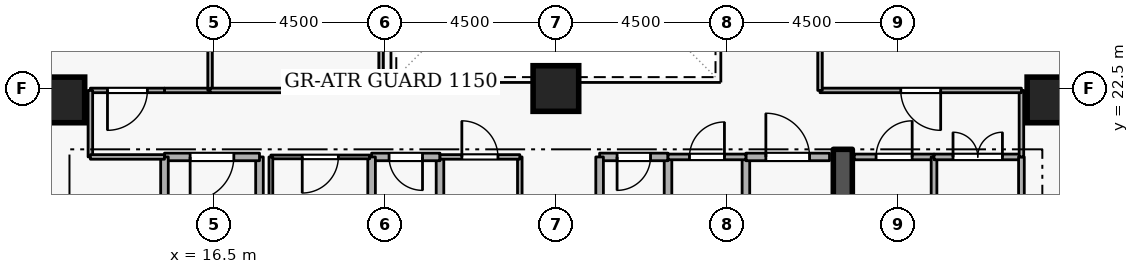
"""IFC4 building model, lengths in metres.
Left out: names, types, materials, properties, quantities, classifications, styles, units other than length and angle.
Written with IfcOpenShell. Run it as: python <this file> out.ifc"""

import sys

from ifc_helpers import new_model, si_unit, direction, frame, frame_2d, origin, origin_2d, place, context, subcontext, project, spatial, rectangle, extrude, element, fill, save


model = new_model("IFC4")
c1 = context("Model", 3, precision=1e-05, world=origin(), true_north=direction((0.0, 1.0)))
c2 = subcontext(c1, "Body", "Model", "MODEL_VIEW")
j1 = project(units=[si_unit("LENGTHUNIT", "METRE"), si_unit("PLANEANGLEUNIT", "RADIAN")], contexts=[c1])
p1 = place(None, origin())
s1 = spatial("IfcSite", under=j1, at=p1, CompositionType="ELEMENT")
p2 = place(p1, origin())
s2 = spatial("IfcBuilding", under=s1, at=p2, CompositionType="ELEMENT")
p3 = place(p2, frame((0.0, 0.0, 130.5)))
s3 = spatial("IfcBuildingStorey", under=s2, at=p3, CompositionType="ELEMENT", Elevation=130.5)
p4 = place(p3, frame((33.05, 15.1, 0.0), z_axis=(0.0, 0.0, 1.0), x_axis=(0.0, 1.0, 0.0)))
e1 = element("IfcWall", 1, at=p4, inside=s3, PredefinedType="SHEAR", context=c2, shape_type="SweptSolid", body=[
    extrude(rectangle(XDim=5.8, YDim=0.5, at=frame_2d((2.9, 0.0))), origin(), (0.0, 0.0, 1.0), 3.6),
])
for number, where, z_axis, x_axis in (
    (2, (12.5, 22.2, 0.0), (0.0, 0.0, 1.0), (1.0, 0.0, 0.0)),
    (3, (38.5, 22.2, 0.0), (0.0, 0.0, 1.0), (1.0, 0.0, 0.0)),
    (4, (25.5, 22.5, 0.0), (0.0, 0.0, 1.0), (1.0, 0.0, 0.0)),
):
    element("IfcColumn", number, at=place(p3, frame(where, z_axis=z_axis, x_axis=x_axis)), inside=s3, PredefinedType="COLUMN", context=c2, shape_type="SweptSolid", body=[
        extrude(rectangle(XDim=1.2, YDim=1.2, at=origin_2d()), origin(), (0.0, 0.0, 1.0), 3.6),
    ])
p5 = place(p3, frame((17.7, 18.4, 0.0), z_axis=(0.0, 0.0, 1.0), x_axis=(0.0, 1.0, 0.0)))
e5 = element("IfcWall", 5, at=p5, inside=s3, PredefinedType="STANDARD", context=c2, shape_type="SweptSolid", body=[
    extrude(rectangle(XDim=2.3, YDim=0.2, at=frame_2d((1.15, 0.0))), origin(), (0.0, 0.0, 1.0), 2.545),
])
p6 = place(p3, frame((17.7, 20.7, 0.0), z_axis=(0.0, 0.0, 1.0), x_axis=(-1.0, 0.0, 0.0)))
e6 = element("IfcWall", 6, at=p6, inside=s3, PredefinedType="STANDARD", context=c2, shape_type="SweptSolid", body=[
    extrude(rectangle(XDim=2.5, YDim=0.2, at=frame_2d((1.25, 0.0))), origin(), (0.0, 0.0, 1.0), 3.34),
])
p7 = place(p6, frame((0.675, 0.0, 0.0)))
e7 = element("IfcOpeningElement", 7, at=p7, cuts=e6, PredefinedType="OPENING", context=c2, shape_type="SweptSolid", body=[
    extrude(rectangle(XDim=1.15, YDim=2.1, at=frame_2d((0.575, 1.05))), frame((0.0, 0.11, 0.0), z_axis=(0.0, -1.0, 0.0), x_axis=(1.0, 0.0, 0.0)), (0.0, 0.0, 1.0), 0.22),
])
p8 = place(p3, frame((15.2, 20.7, 0.0), z_axis=(0.0, 0.0, 1.0), x_axis=(0.0, -1.0, 0.0)))
e8 = element("IfcWall", 8, at=p8, inside=s3, PredefinedType="STANDARD", context=c2, shape_type="SweptSolid", body=[
    extrude(rectangle(XDim=5.7, YDim=0.2, at=frame_2d((2.85, 0.0))), origin(), (0.0, 0.0, 1.0), 3.34),
])
p9 = place(p3, frame((28.45, 18.65, 0.0), z_axis=(0.0, 0.0, 1.0), x_axis=(0.0, 1.0, 0.0)))
e9 = element("IfcWall", 9, at=p9, inside=s3, PredefinedType="STANDARD", context=c2, shape_type="SweptSolid", body=[
    extrude(rectangle(XDim=2.05, YDim=0.2, at=frame_2d((1.025, 0.0))), origin(), (0.0, 0.0, 1.0), 3.34),
])
p10 = place(p3, frame((28.45, 20.7, 0.0), z_axis=(0.0, 0.0, 1.0), x_axis=(-1.0, 0.0, 0.0)))
e10 = element("IfcWall", 10, at=p10, inside=s3, PredefinedType="STANDARD", context=c2, shape_type="SweptSolid", body=[
    extrude(rectangle(XDim=1.8, YDim=0.2, at=frame_2d((0.9, 0.0))), origin(), (0.0, 0.0, 1.0), 3.34),
])
p11 = place(p10, frame((0.46, 0.0, 0.0)))
e11 = element("IfcOpeningElement", 11, at=p11, cuts=e10, PredefinedType="OPENING", context=c2, shape_type="SweptSolid", body=[
    extrude(rectangle(XDim=0.88, YDim=2.04, at=frame_2d((0.44, 1.02))), frame((0.0, 0.11, 0.0), z_axis=(0.0, -1.0, 0.0), x_axis=(1.0, 0.0, 0.0)), (0.0, 0.0, 1.0), 0.22),
])
for number, where, z_axis, x_axis in (
    (12, (26.65, 20.7, 0.0), (0.0, 0.0, 1.0), (0.0, -1.0, 0.0)),
    (13, (22.45, 18.65, 0.0), (0.0, 0.0, 1.0), (0.0, 1.0, 0.0)),
):
    element("IfcWall", number, at=place(p3, frame(where, z_axis=z_axis, x_axis=x_axis)), inside=s3, PredefinedType="STANDARD", context=c2, shape_type="SweptSolid", body=[
        extrude(rectangle(XDim=2.05, YDim=0.2, at=frame_2d((1.025, 0.0))), origin(), (0.0, 0.0, 1.0), 3.34),
    ])
p12 = place(p3, frame((22.45, 20.7, 0.0), z_axis=(0.0, 0.0, 1.0), x_axis=(-1.0, 0.0, 0.0)))
e14 = element("IfcWall", 14, at=p12, inside=s3, PredefinedType="STANDARD", context=c2, shape_type="SweptSolid", body=[
    extrude(rectangle(XDim=1.8, YDim=0.2, at=frame_2d((0.9, 0.0))), origin(), (0.0, 0.0, 1.0), 3.34),
])
p13 = place(p12, frame((0.46, 0.0, 0.0)))
e15 = element("IfcOpeningElement", 15, at=p13, cuts=e14, PredefinedType="OPENING", context=c2, shape_type="SweptSolid", body=[
    extrude(rectangle(XDim=0.88, YDim=2.04, at=frame_2d((0.44, 1.02))), frame((0.0, 0.11, 0.0), z_axis=(0.0, -1.0, 0.0), x_axis=(1.0, 0.0, 0.0)), (0.0, 0.0, 1.0), 0.22),
])
for number, where, z_axis, x_axis in (
    (16, (20.65, 20.7, 0.0), (0.0, 0.0, 1.0), (0.0, -1.0, 0.0)),
    (17, (30.5, 18.65, 0.0), (0.0, 0.0, 1.0), (0.0, 1.0, 0.0)),
):
    element("IfcWall", number, at=place(p3, frame(where, z_axis=z_axis, x_axis=x_axis)), inside=s3, PredefinedType="STANDARD", context=c2, shape_type="SweptSolid", body=[
        extrude(rectangle(XDim=2.05, YDim=0.2, at=frame_2d((1.025, 0.0))), origin(), (0.0, 0.0, 1.0), 3.34),
    ])
p14 = place(p3, frame((30.5, 20.7, 0.0), z_axis=(0.0, 0.0, 1.0), x_axis=(1.0, 0.0, 0.0)))
e18 = element("IfcWall", 18, at=p14, inside=s3, PredefinedType="STANDARD", context=c2, shape_type="SweptSolid", body=[
    extrude(rectangle(XDim=2.2, YDim=0.2, at=frame_2d((1.1, 0.0))), origin(), (0.0, 0.0, 1.0), 3.34),
])
p15 = place(p14, frame((0.525, 0.0, 0.0)))
e19 = element("IfcOpeningElement", 19, at=p15, cuts=e18, PredefinedType="OPENING", context=c2, shape_type="SweptSolid", body=[
    extrude(rectangle(XDim=1.15, YDim=2.1, at=frame_2d((0.575, 1.05))), frame((0.0, 0.11, 0.0), z_axis=(0.0, -1.0, 0.0), x_axis=(1.0, 0.0, 0.0)), (0.0, 0.0, 1.0), 0.22),
])
p16 = place(p3, frame((20.6, 20.7, 0.0), z_axis=(0.0, 0.0, 1.0), x_axis=(-1.0, 0.0, 0.0)))
e20 = element("IfcWall", 20, at=p16, inside=s3, PredefinedType="PARTITIONING", context=c2, shape_type="SweptSolid", body=[
    extrude(rectangle(XDim=2.6, YDim=0.1, at=frame_2d((1.3, 0.0))), origin(), (0.0, 0.0, 1.0), 3.34),
])
p17 = place(p16, frame((0.825, 0.0, 0.0)))
e21 = element("IfcOpeningElement", 21, at=p17, cuts=e20, PredefinedType="OPENING", context=c2, shape_type="SweptSolid", body=[
    extrude(rectangle(XDim=0.95, YDim=2.1, at=frame_2d((0.475, 1.05))), frame((0.0, 0.06, 0.0), z_axis=(0.0, -1.0, 0.0), x_axis=(1.0, 0.0, 0.0)), (0.0, 0.0, 1.0), 0.12),
])
p18 = place(p3, frame((18.0, 20.7, 0.0), z_axis=(0.0, 0.0, 1.0), x_axis=(0.0, -1.0, 0.0)))
e22 = element("IfcWall", 22, at=p18, inside=s3, PredefinedType="PARTITIONING", context=c2, shape_type="SweptSolid", body=[
    extrude(rectangle(XDim=2.05, YDim=0.1, at=frame_2d((1.025, 0.0))), origin(), (0.0, 0.0, 1.0), 2.545),
])
p19 = place(p3, frame((24.55, 20.7, 0.0), z_axis=(0.0, 0.0, 1.0), x_axis=(0.0, -1.0, 0.0)))
e23 = element("IfcWall", 23, at=p19, inside=s3, PredefinedType="PARTITIONING", context=c2, shape_type="SweptSolid", body=[
    extrude(rectangle(XDim=2.05, YDim=0.12, at=frame_2d((1.025, 0.0))), origin(), (0.0, 0.0, 1.0), 3.34),
])
p20 = place(p3, frame((22.45, 20.7, 0.0), z_axis=(0.0, 0.0, 1.0), x_axis=(1.0, 0.0, 0.0)))
e24 = element("IfcWall", 24, at=p20, inside=s3, PredefinedType="PARTITIONING", context=c2, shape_type="SweptSolid", body=[
    extrude(rectangle(XDim=2.1, YDim=0.12, at=frame_2d((1.05, 0.0))), origin(), (0.0, 0.0, 1.0), 3.34),
])
p21 = place(p20, frame((0.575, 0.0, 0.0)))
e25 = element("IfcOpeningElement", 25, at=p21, cuts=e24, PredefinedType="OPENING", context=c2, shape_type="SweptSolid", body=[
    extrude(rectangle(XDim=0.95, YDim=2.1, at=frame_2d((0.475, 1.05))), frame((0.0, 0.07, 0.0), z_axis=(0.0, -1.0, 0.0), x_axis=(1.0, 0.0, 0.0)), (0.0, 0.0, 1.0), 0.14),
])
p22 = place(p3, frame((28.45, 20.7, 0.0), z_axis=(0.0, 0.0, 1.0), x_axis=(1.0, 0.0, 0.0)))
e26 = element("IfcWall", 26, at=p22, inside=s3, PredefinedType="PARTITIONING", context=c2, shape_type="SweptSolid", body=[
    extrude(rectangle(XDim=2.05, YDim=0.15, at=frame_2d((1.025, 0.0))), origin(), (0.0, 0.0, 1.0), 3.34),
])
p23 = place(p22, frame((0.565, 0.0, 0.0)))
e27 = element("IfcOpeningElement", 27, at=p23, cuts=e26, PredefinedType="OPENING", context=c2, shape_type="SweptSolid", body=[
    extrude(rectangle(XDim=0.92, YDim=2.08, at=frame_2d((0.46, 1.04))), frame((0.0, 0.085, 0.0), z_axis=(0.0, -1.0, 0.0), x_axis=(1.0, 0.0, 0.0)), (0.0, 0.0, 1.0), 0.17),
])
p24 = place(p3, frame((33.35, 20.7, 0.0), z_axis=(0.0, 0.0, 1.0), x_axis=(1.0, 0.0, 0.0)))
e28 = element("IfcWall", 28, at=p24, inside=s3, PredefinedType="PARTITIONING", context=c2, shape_type="SweptSolid", body=[
    extrude(rectangle(XDim=2.1, YDim=0.15, at=frame_2d((1.05, 0.0))), origin(), (0.0, 0.0, 1.0), 3.34),
])
p25 = place(p24, frame((0.575, 0.0, 0.0)))
e29 = element("IfcOpeningElement", 29, at=p25, cuts=e28, PredefinedType="OPENING", context=c2, shape_type="SweptSolid", body=[
    extrude(rectangle(XDim=0.95, YDim=2.1, at=frame_2d((0.475, 1.05))), frame((0.0, 0.085, 0.0), z_axis=(0.0, -1.0, 0.0), x_axis=(1.0, 0.0, 0.0)), (0.0, 0.0, 1.0), 0.17),
])
p26 = place(p3, frame((35.45, 20.7, 0.0), z_axis=(0.0, 0.0, 1.0), x_axis=(0.0, -1.0, 0.0)))
e30 = element("IfcWall", 30, at=p26, inside=s3, PredefinedType="PARTITIONING", context=c2, shape_type="SweptSolid", body=[
    extrude(rectangle(XDim=5.65, YDim=0.15, at=frame_2d((2.825, 0.0))), origin(), (0.0, 0.0, 1.0), 3.34),
])
p27 = place(p3, frame((35.45, 20.7, 0.0), z_axis=(0.0, 0.0, 1.0), x_axis=(1.0, 0.0, 0.0)))
e31 = element("IfcWall", 31, at=p27, inside=s3, PredefinedType="PARTITIONING", context=c2, shape_type="SweptSolid", body=[
    extrude(rectangle(XDim=2.3, YDim=0.15, at=frame_2d((1.15, 0.0))), origin(), (0.0, 0.0, 1.0), 3.34),
])
p28 = place(p27, frame((0.5, 0.0, 0.0)))
e32 = element("IfcOpeningElement", 32, at=p28, cuts=e31, PredefinedType="OPENING", context=c2, shape_type="SweptSolid", body=[
    extrude(rectangle(XDim=1.3, YDim=2.12, at=frame_2d((0.65, 1.06))), frame((0.0, 0.085, 0.0), z_axis=(0.0, -1.0, 0.0), x_axis=(1.0, 0.0, 0.0)), (0.0, 0.0, 1.0), 0.17),
])
p29 = place(p3, frame((37.75, 20.7, 0.0), z_axis=(0.0, 0.0, 1.0), x_axis=(0.0, -1.0, 0.0)))
e33 = element("IfcWall", 33, at=p29, inside=s3, PredefinedType="PARTITIONING", context=c2, shape_type="SweptSolid", body=[
    extrude(rectangle(XDim=5.65, YDim=0.15, at=frame_2d((2.825, 0.0))), origin(), (0.0, 0.0, 1.0), 3.34),
])
p30 = place(p3, frame((16.4, 22.45, 0.0), z_axis=(0.0, 0.0, 1.0), x_axis=(-1.0, 0.0, 0.0)))
e34 = element("IfcWall", 34, at=p30, inside=s3, PredefinedType="PARTITIONING", context=c2, shape_type="SweptSolid", body=[
    extrude(rectangle(XDim=1.2, YDim=0.12, at=frame_2d((0.6, 0.0))), origin(), (0.0, 0.0, 1.0), 3.34),
])
p31 = place(p3, frame((15.2, 22.45, 0.0), z_axis=(0.0, 0.0, 1.0), x_axis=(-1.0, 0.0, 0.0)))
e35 = element("IfcWall", 35, at=p31, inside=s3, PredefinedType="PARTITIONING", context=c2, shape_type="SweptSolid", body=[
    extrude(rectangle(XDim=1.95, YDim=0.12, at=frame_2d((0.975, 0.0))), origin(), (0.0, 0.0, 1.0), 3.34),
])
p32 = place(p31, frame((0.45, 0.0, 0.0)))
e36 = element("IfcOpeningElement", 36, at=p32, cuts=e35, PredefinedType="OPENING", context=c2, shape_type="SweptSolid", body=[
    extrude(rectangle(XDim=1.05, YDim=2.1, at=frame_2d((0.525, 1.05))), frame((0.0, 0.07, 0.0), z_axis=(0.0, -1.0, 0.0), x_axis=(1.0, 0.0, 0.0)), (0.0, 0.0, 1.0), 0.14),
])
p33 = place(p3, frame((13.25, 22.45, 0.0), z_axis=(0.0, 0.0, 1.0), x_axis=(0.0, -1.0, 0.0)))
e37 = element("IfcWall", 37, at=p33, inside=s3, PredefinedType="PARTITIONING", context=c2, shape_type="SweptSolid", body=[
    extrude(rectangle(XDim=1.75, YDim=0.12, at=frame_2d((0.875, 0.0))), origin(), (0.0, 0.0, 1.0), 3.34),
])
p34 = place(p3, frame((13.25, 20.7, 0.0), z_axis=(0.0, 0.0, 1.0), x_axis=(1.0, 0.0, 0.0)))
e38 = element("IfcWall", 38, at=p34, inside=s3, PredefinedType="PARTITIONING", context=c2, shape_type="SweptSolid", body=[
    extrude(rectangle(XDim=1.95, YDim=0.12, at=frame_2d((0.975, 0.0))), origin(), (0.0, 0.0, 1.0), 3.34),
])
p35 = place(p3, frame((16.4, 27.0, 0.0), z_axis=(0.0, 0.0, 1.0), x_axis=(0.0, -1.0, 0.0)))
e39 = element("IfcWall", 39, at=p35, inside=s3, PredefinedType="PARTITIONING", context=c2, shape_type="SweptSolid", body=[
    extrude(rectangle(XDim=4.55, YDim=0.12, at=frame_2d((2.275, 0.0))), origin(), (0.0, 0.0, 1.0), 3.34),
])
p36 = place(p3, frame((20.9, 31.55, 0.0), z_axis=(0.0, 0.0, 1.0), x_axis=(0.0, -1.0, 0.0)))
e40 = element("IfcWall", 40, at=p36, inside=s3, PredefinedType="PARTITIONING", context=c2, shape_type="SweptSolid", body=[
    extrude(rectangle(XDim=9.1, YDim=0.12, at=frame_2d((4.55, 0.0))), origin(), (0.0, 0.0, 1.0), 3.34),
])
p37 = place(p3, frame((20.9, 22.45, 0.0), z_axis=(0.0, 0.0, 1.0), x_axis=(-1.0, 0.0, 0.0)))
e41 = element("IfcWall", 41, at=p37, inside=s3, PredefinedType="PARTITIONING", context=c2, shape_type="SweptSolid", body=[
    extrude(rectangle(XDim=4.5, YDim=0.12, at=frame_2d((2.25, 0.0))), origin(), (0.0, 0.0, 1.0), 3.34),
])
p38 = place(p3, frame((37.75, 20.7, 0.0), z_axis=(0.0, 0.0, 1.0), x_axis=(0.0, 1.0, 0.0)))
e42 = element("IfcWall", 42, at=p38, inside=s3, PredefinedType="PARTITIONING", context=c2, shape_type="SweptSolid", body=[
    extrude(rectangle(XDim=1.75, YDim=0.12, at=frame_2d((0.875, 0.0))), origin(), (0.0, 0.0, 1.0), 3.34),
])
p39 = place(p3, frame((37.75, 22.45, 0.0), z_axis=(0.0, 0.0, 1.0), x_axis=(-1.0, 0.0, 0.0)))
e43 = element("IfcWall", 43, at=p39, inside=s3, PredefinedType="PARTITIONING", context=c2, shape_type="SweptSolid", body=[
    extrude(rectangle(XDim=5.3, YDim=0.12, at=frame_2d((2.65, 0.0))), origin(), (0.0, 0.0, 1.0), 3.34),
])
p40 = place(p39, frame((2.125, 0.0, 0.0)))
e44 = element("IfcOpeningElement", 44, at=p40, cuts=e43, PredefinedType="OPENING", context=c2, shape_type="SweptSolid", body=[
    extrude(rectangle(XDim=1.05, YDim=2.1, at=frame_2d((0.525, 1.05))), frame((0.0, 0.07, 0.0), z_axis=(0.0, -1.0, 0.0), x_axis=(1.0, 0.0, 0.0)), (0.0, 0.0, 1.0), 0.14),
])
p41 = place(p3, frame((32.45, 22.45, 0.0), z_axis=(0.0, 0.0, 1.0), x_axis=(0.0, 1.0, 0.0)))
e45 = element("IfcWall", 45, at=p41, inside=s3, PredefinedType="PARTITIONING", context=c2, shape_type="SweptSolid", body=[
    extrude(rectangle(XDim=2.95, YDim=0.12, at=frame_2d((1.475, 0.0))), origin(), (0.0, 0.0, 1.0), 3.34),
])
p42 = place(p7, origin())
e46 = element("IfcDoor", 46, at=p42, inside=s3, OperationType="SINGLE_SWING_RIGHT", PredefinedType="DOOR", context=c2, shape_type="SweptSolid", body=[
    extrude(rectangle(XDim=1.15, YDim=2.1, at=frame_2d((0.575, 1.05))), frame((0.0, 0.025, 0.0), z_axis=(0.0, -1.0, 0.0), x_axis=(1.0, 0.0, 0.0)), (0.0, 0.0, 1.0), 0.05),
])
fill(e7, e46)
p43 = place(p11, origin())
e47 = element("IfcDoor", 47, at=p43, inside=s3, OperationType="SINGLE_SWING_RIGHT", PredefinedType="DOOR", context=c2, shape_type="SweptSolid", body=[
    extrude(rectangle(XDim=0.88, YDim=2.04, at=frame_2d((0.44, 1.02))), frame((0.0, 0.025, 0.0), z_axis=(0.0, -1.0, 0.0), x_axis=(1.0, 0.0, 0.0)), (0.0, 0.0, 1.0), 0.05),
])
fill(e11, e47)
p44 = place(p13, origin())
e48 = element("IfcDoor", 48, at=p44, inside=s3, OperationType="SINGLE_SWING_LEFT", PredefinedType="DOOR", context=c2, shape_type="SweptSolid", body=[
    extrude(rectangle(XDim=0.88, YDim=2.04, at=frame_2d((0.44, 1.02))), frame((0.0, 0.025, 0.0), z_axis=(0.0, -1.0, 0.0), x_axis=(1.0, 0.0, 0.0)), (0.0, 0.0, 1.0), 0.05),
])
fill(e15, e48)
p45 = place(p17, origin())
e49 = element("IfcDoor", 49, at=p45, inside=s3, OperationType="SINGLE_SWING_RIGHT", PredefinedType="DOOR", context=c2, shape_type="SweptSolid", body=[
    extrude(rectangle(XDim=0.95, YDim=2.1, at=frame_2d((0.475, 1.05))), frame((0.0, 0.025, 0.0), z_axis=(0.0, -1.0, 0.0), x_axis=(1.0, 0.0, 0.0)), (0.0, 0.0, 1.0), 0.05),
])
fill(e21, e49)
p46 = place(p21, origin())
e50 = element("IfcDoor", 50, at=p46, inside=s3, OperationType="SINGLE_SWING_LEFT", PredefinedType="DOOR", context=c2, shape_type="SweptSolid", body=[
    extrude(rectangle(XDim=0.95, YDim=2.1, at=frame_2d((0.475, 1.05))), frame((0.0, 0.025, 0.0), z_axis=(0.0, -1.0, 0.0), x_axis=(1.0, 0.0, 0.0)), (0.0, 0.0, 1.0), 0.05),
])
fill(e25, e50)
p47 = place(p23, origin())
e51 = element("IfcDoor", 51, at=p47, inside=s3, OperationType="SINGLE_SWING_RIGHT", PredefinedType="DOOR", context=c2, shape_type="SweptSolid", body=[
    extrude(rectangle(XDim=0.92, YDim=2.08, at=frame_2d((0.46, 1.04))), frame((0.0, 0.025, 0.0), z_axis=(0.0, -1.0, 0.0), x_axis=(1.0, 0.0, 0.0)), (0.0, 0.0, 1.0), 0.05),
])
fill(e27, e51)
p48 = place(p15, origin())
e52 = element("IfcDoor", 52, at=p48, inside=s3, OperationType="SINGLE_SWING_LEFT", PredefinedType="DOOR", context=c2, shape_type="SweptSolid", body=[
    extrude(rectangle(XDim=1.15, YDim=2.1, at=frame_2d((0.575, 1.05))), frame((0.0, 0.025, 0.0), z_axis=(0.0, -1.0, 0.0), x_axis=(1.0, 0.0, 0.0)), (0.0, 0.0, 1.0), 0.05),
])
fill(e19, e52)
p49 = place(p25, origin())
e53 = element("IfcDoor", 53, at=p49, inside=s3, OperationType="SINGLE_SWING_RIGHT", PredefinedType="DOOR", context=c2, shape_type="SweptSolid", body=[
    extrude(rectangle(XDim=0.95, YDim=2.1, at=frame_2d((0.475, 1.05))), frame((0.0, 0.025, 0.0), z_axis=(0.0, -1.0, 0.0), x_axis=(1.0, 0.0, 0.0)), (0.0, 0.0, 1.0), 0.05),
])
fill(e29, e53)
p50 = place(p28, origin())
e54 = element("IfcDoor", 54, at=p50, inside=s3, OperationType="DOUBLE_DOOR_SINGLE_SWING", PredefinedType="DOOR", context=c2, shape_type="SweptSolid", body=[
    extrude(rectangle(XDim=1.3, YDim=2.12, at=frame_2d((0.65, 1.06))), frame((0.0, 0.025, 0.0), z_axis=(0.0, -1.0, 0.0), x_axis=(1.0, 0.0, 0.0)), (0.0, 0.0, 1.0), 0.05),
])
fill(e32, e54)
p51 = place(p32, origin())
e55 = element("IfcDoor", 55, at=p51, inside=s3, OperationType="SINGLE_SWING_RIGHT", PredefinedType="DOOR", context=c2, shape_type="SweptSolid", body=[
    extrude(rectangle(XDim=1.05, YDim=2.1, at=frame_2d((0.525, 1.05))), frame((0.0, 0.025, 0.0), z_axis=(0.0, -1.0, 0.0), x_axis=(1.0, 0.0, 0.0)), (0.0, 0.0, 1.0), 0.05),
])
fill(e36, e55)
p52 = place(p40, origin())
e56 = element("IfcDoor", 56, at=p52, inside=s3, OperationType="SINGLE_SWING_LEFT", PredefinedType="DOOR", context=c2, shape_type="SweptSolid", body=[
    extrude(rectangle(XDim=1.05, YDim=2.1, at=frame_2d((0.525, 1.05))), frame((0.0, 0.025, 0.0), z_axis=(0.0, -1.0, 0.0), x_axis=(1.0, 0.0, 0.0)), (0.0, 0.0, 1.0), 0.05),
])
fill(e44, e56)
save(model, sys.argv[1])
